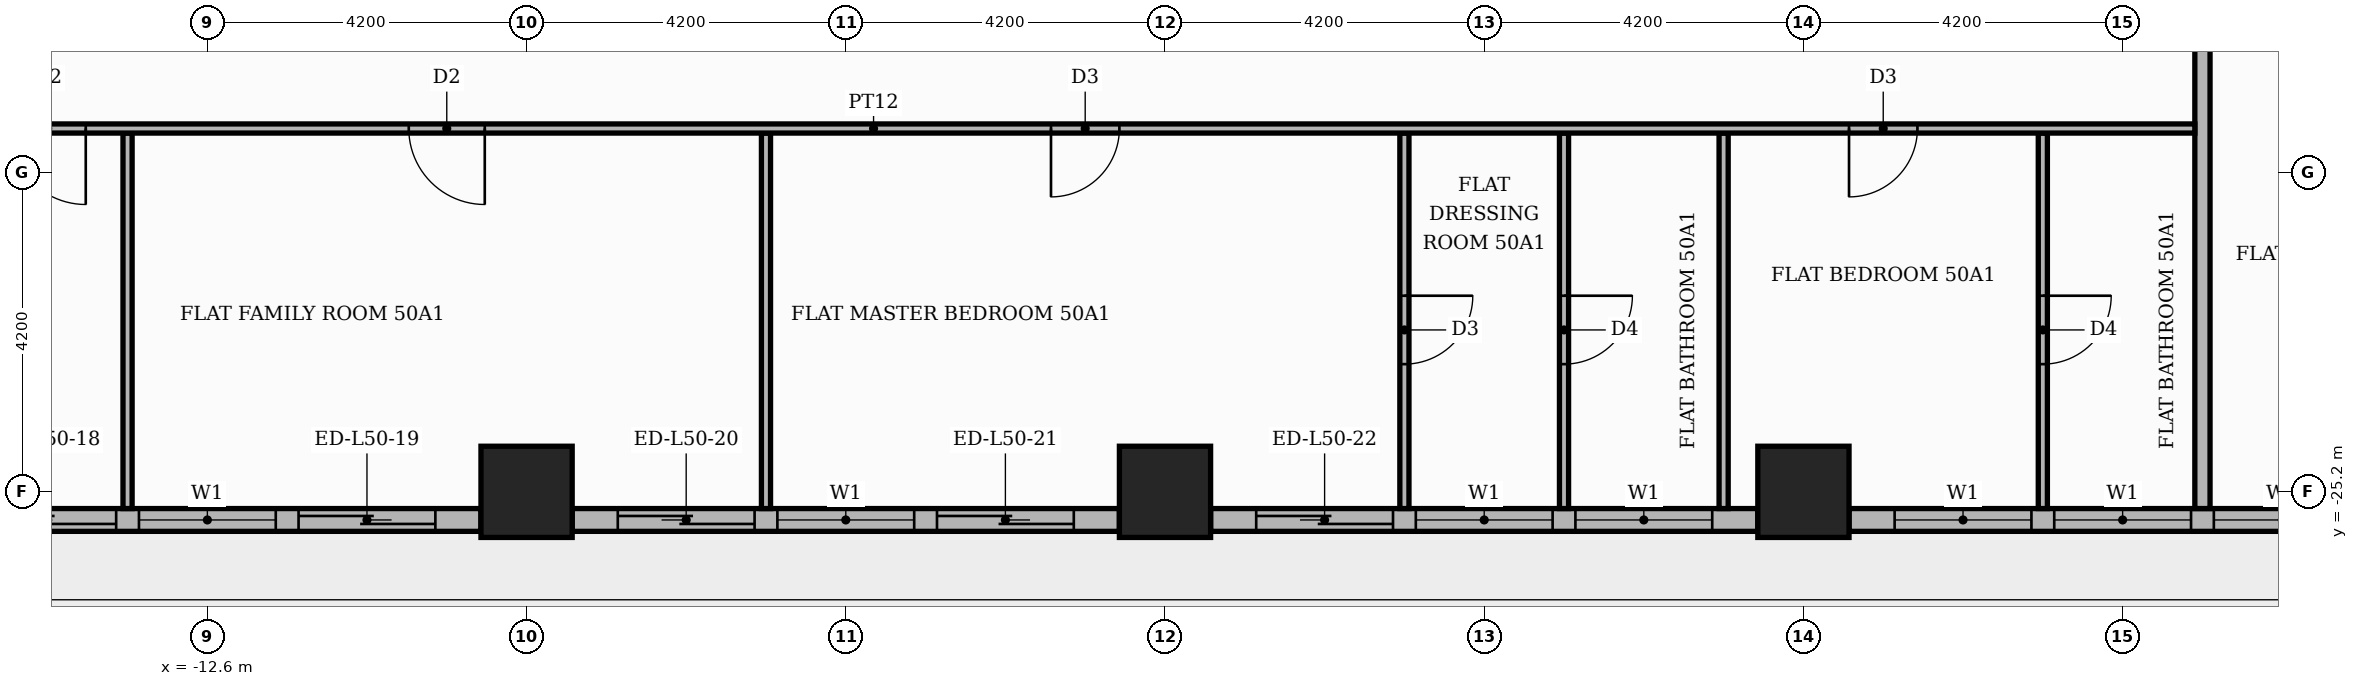
"""IFC4 building model, lengths in metres.
Left out: names, types, materials, properties, quantities, classifications, styles, units other than length and angle.
Written with IfcOpenShell. Run it as: python <this file> out.ifc"""

import sys

from ifc_helpers import new_model, si_unit, direction, frame, frame_2d, origin, origin_2d, place, context, subcontext, project, spatial, rectangle, extrude, element, fill, save


model = new_model("IFC4")
c1 = context("Model", 3, precision=1e-05, world=origin(), true_north=direction((0.0, 1.0)))
c2 = subcontext(c1, "Body", "Model", "MODEL_VIEW")
j1 = project(units=[si_unit("LENGTHUNIT", "METRE"), si_unit("PLANEANGLEUNIT", "RADIAN")], contexts=[c1])
p1 = place(None, origin())
s1 = spatial("IfcSite", under=j1, at=p1, CompositionType="ELEMENT")
p2 = place(p1, origin())
s2 = spatial("IfcBuilding", under=s1, at=p2, CompositionType="ELEMENT")
p3 = place(p2, frame((0.0, 0.0, 211.8)))
s3 = spatial("IfcBuildingStorey", under=s2, at=p3, CompositionType="ELEMENT", Elevation=211.8)
for number, where, z_axis, x_axis in (
    (1, (0.0, -25.2, 0.0), (0.0, 0.0, 1.0), (1.0, 0.0, 0.0)),
    (2, (8.4, -25.2, 0.0), (0.0, 0.0, 1.0), (1.0, 0.0, 0.0)),
    (3, (-8.4, -25.2, 0.0), (0.0, 0.0, 1.0), (1.0, 0.0, 0.0)),
):
    element("IfcColumn", number, at=place(p3, frame(where, z_axis=z_axis, x_axis=x_axis)), inside=s3, PredefinedType="COLUMN", context=c2, shape_type="SweptSolid", body=[
        extrude(rectangle(XDim=1.2, YDim=1.2, at=origin_2d()), origin(), (0.0, 0.0, 1.0), 3.9),
    ])
p4 = place(p3, frame((-16.2, -25.57, 0.0), z_axis=(0.0, 0.0, 1.0), x_axis=(1.0, 0.0, 0.0)))
e4 = element("IfcWall", 4, at=p4, inside=s3, PredefinedType="STANDARD", context=c2, shape_type="SweptSolid", body=[
    extrude(rectangle(XDim=7.2, YDim=0.3, at=frame_2d((3.6, 0.0))), origin(), (0.0, 0.0, 1.0), 3.48),
])
p5 = place(p4, frame((0.6, 0.0, 0.0)))
e5 = element("IfcOpeningElement", 5, at=p5, cuts=e4, PredefinedType="OPENING", context=c2, shape_type="SweptSolid", body=[
    extrude(rectangle(XDim=1.8, YDim=2.4, at=frame_2d((0.9, 1.2))), frame((0.0, 0.16, 0.0), z_axis=(0.0, -1.0, 0.0), x_axis=(1.0, 0.0, 0.0)), (0.0, 0.0, 1.0), 0.32),
])
p6 = place(p4, frame((2.7, 0.0, 0.9)))
e6 = element("IfcOpeningElement", 6, at=p6, cuts=e4, PredefinedType="OPENING", context=c2, shape_type="SweptSolid", body=[
    extrude(rectangle(XDim=1.8, YDim=2.1, at=frame_2d((0.9, 1.05))), frame((0.0, 0.16, 0.0), z_axis=(0.0, -1.0, 0.0), x_axis=(1.0, 0.0, 0.0)), (0.0, 0.0, 1.0), 0.32),
])
p7 = place(p4, frame((4.8, 0.0, 0.0)))
e7 = element("IfcOpeningElement", 7, at=p7, cuts=e4, PredefinedType="OPENING", context=c2, shape_type="SweptSolid", body=[
    extrude(rectangle(XDim=1.8, YDim=2.4, at=frame_2d((0.9, 1.2))), frame((0.0, 0.16, 0.0), z_axis=(0.0, -1.0, 0.0), x_axis=(1.0, 0.0, 0.0)), (0.0, 0.0, 1.0), 0.32),
])
p8 = place(p3, frame((-7.8, -25.57, 0.0), z_axis=(0.0, 0.0, 1.0), x_axis=(1.0, 0.0, 0.0)))
e8 = element("IfcWall", 8, at=p8, inside=s3, PredefinedType="STANDARD", context=c2, shape_type="SweptSolid", body=[
    extrude(rectangle(XDim=7.2, YDim=0.3, at=frame_2d((3.6, 0.0))), origin(), (0.0, 0.0, 1.0), 3.48),
])
p9 = place(p8, frame((0.6, 0.0, 0.0)))
e9 = element("IfcOpeningElement", 9, at=p9, cuts=e8, PredefinedType="OPENING", context=c2, shape_type="SweptSolid", body=[
    extrude(rectangle(XDim=1.8, YDim=2.4, at=frame_2d((0.9, 1.2))), frame((0.0, 0.16, 0.0), z_axis=(0.0, -1.0, 0.0), x_axis=(1.0, 0.0, 0.0)), (0.0, 0.0, 1.0), 0.32),
])
p10 = place(p8, frame((2.7, 0.0, 0.9)))
e10 = element("IfcOpeningElement", 10, at=p10, cuts=e8, PredefinedType="OPENING", context=c2, shape_type="SweptSolid", body=[
    extrude(rectangle(XDim=1.8, YDim=2.1, at=frame_2d((0.9, 1.05))), frame((0.0, 0.16, 0.0), z_axis=(0.0, -1.0, 0.0), x_axis=(1.0, 0.0, 0.0)), (0.0, 0.0, 1.0), 0.32),
])
p11 = place(p8, frame((4.8, 0.0, 0.0)))
e11 = element("IfcOpeningElement", 11, at=p11, cuts=e8, PredefinedType="OPENING", context=c2, shape_type="SweptSolid", body=[
    extrude(rectangle(XDim=1.8, YDim=2.4, at=frame_2d((0.9, 1.2))), frame((0.0, 0.16, 0.0), z_axis=(0.0, -1.0, 0.0), x_axis=(1.0, 0.0, 0.0)), (0.0, 0.0, 1.0), 0.32),
])
p12 = place(p3, frame((0.6, -25.57, 0.0), z_axis=(0.0, 0.0, 1.0), x_axis=(1.0, 0.0, 0.0)))
e12 = element("IfcWall", 12, at=p12, inside=s3, PredefinedType="STANDARD", context=c2, shape_type="SweptSolid", body=[
    extrude(rectangle(XDim=7.2, YDim=0.3, at=frame_2d((3.6, 0.0))), origin(), (0.0, 0.0, 1.0), 3.48),
])
p13 = place(p12, frame((0.6, 0.0, 0.0)))
e13 = element("IfcOpeningElement", 13, at=p13, cuts=e12, PredefinedType="OPENING", context=c2, shape_type="SweptSolid", body=[
    extrude(rectangle(XDim=1.8, YDim=2.4, at=frame_2d((0.9, 1.2))), frame((0.0, 0.16, 0.0), z_axis=(0.0, -1.0, 0.0), x_axis=(1.0, 0.0, 0.0)), (0.0, 0.0, 1.0), 0.32),
])
p14 = place(p12, frame((2.7, 0.0, 0.9)))
e14 = element("IfcOpeningElement", 14, at=p14, cuts=e12, PredefinedType="OPENING", context=c2, shape_type="SweptSolid", body=[
    extrude(rectangle(XDim=1.8, YDim=2.1, at=frame_2d((0.9, 1.05))), frame((0.0, 0.16, 0.0), z_axis=(0.0, -1.0, 0.0), x_axis=(1.0, 0.0, 0.0)), (0.0, 0.0, 1.0), 0.32),
])
p15 = place(p12, frame((4.8, 0.0, 0.9)))
e15 = element("IfcOpeningElement", 15, at=p15, cuts=e12, PredefinedType="OPENING", context=c2, shape_type="SweptSolid", body=[
    extrude(rectangle(XDim=1.8, YDim=2.1, at=frame_2d((0.9, 1.05))), frame((0.0, 0.16, 0.0), z_axis=(0.0, -1.0, 0.0), x_axis=(1.0, 0.0, 0.0)), (0.0, 0.0, 1.0), 0.32),
])
p16 = place(p3, frame((9.0, -25.57, 0.0), z_axis=(0.0, 0.0, 1.0), x_axis=(1.0, 0.0, 0.0)))
e16 = element("IfcWall", 16, at=p16, inside=s3, PredefinedType="STANDARD", context=c2, shape_type="SweptSolid", body=[
    extrude(rectangle(XDim=7.2, YDim=0.3, at=frame_2d((3.6, 0.0))), origin(), (0.0, 0.0, 1.0), 3.48),
])
p17 = place(p16, frame((0.6, 0.0, 0.9)))
e17 = element("IfcOpeningElement", 17, at=p17, cuts=e16, PredefinedType="OPENING", context=c2, shape_type="SweptSolid", body=[
    extrude(rectangle(XDim=1.8, YDim=2.1, at=frame_2d((0.9, 1.05))), frame((0.0, 0.16, 0.0), z_axis=(0.0, -1.0, 0.0), x_axis=(1.0, 0.0, 0.0)), (0.0, 0.0, 1.0), 0.32),
])
p18 = place(p16, frame((2.7, 0.0, 0.9)))
e18 = element("IfcOpeningElement", 18, at=p18, cuts=e16, PredefinedType="OPENING", context=c2, shape_type="SweptSolid", body=[
    extrude(rectangle(XDim=1.8, YDim=2.1, at=frame_2d((0.9, 1.05))), frame((0.0, 0.16, 0.0), z_axis=(0.0, -1.0, 0.0), x_axis=(1.0, 0.0, 0.0)), (0.0, 0.0, 1.0), 0.32),
])
p19 = place(p16, frame((4.8, 0.0, 0.9)))
e19 = element("IfcOpeningElement", 19, at=p19, cuts=e16, PredefinedType="OPENING", context=c2, shape_type="SweptSolid", body=[
    extrude(rectangle(XDim=1.8, YDim=2.1, at=frame_2d((0.9, 1.05))), frame((0.0, 0.16, 0.0), z_axis=(0.0, -1.0, 0.0), x_axis=(1.0, 0.0, 0.0)), (0.0, 0.0, 1.0), 0.32),
])
for number, where, z_axis, x_axis in (
    (20, (-13.65, -25.42, 0.0), (0.0, 0.0, 1.0), (0.0, 1.0, 0.0)),
    (21, (-5.25, -25.42, 0.0), (0.0, 0.0, 1.0), (0.0, 1.0, 0.0)),
):
    element("IfcWall", number, at=place(p3, frame(where, z_axis=z_axis, x_axis=x_axis)), inside=s3, PredefinedType="PARTITIONING", context=c2, shape_type="SweptSolid", body=[
        extrude(rectangle(XDim=4.94, YDim=0.12, at=frame_2d((2.47, 0.0))), origin(), (0.0, 0.0, 1.0), 3.48),
    ])
p20 = place(p3, frame((3.15, -25.42, 0.0), z_axis=(0.0, 0.0, 1.0), x_axis=(0.0, 1.0, 0.0)))
e22 = element("IfcWall", 22, at=p20, inside=s3, PredefinedType="PARTITIONING", context=c2, shape_type="SweptSolid", body=[
    extrude(rectangle(XDim=4.94, YDim=0.12, at=frame_2d((2.47, 0.0))), origin(), (0.0, 0.0, 1.0), 3.48),
])
p21 = place(p20, frame((1.9, 0.0, 0.0)))
e23 = element("IfcOpeningElement", 23, at=p21, cuts=e22, PredefinedType="OPENING", context=c2, shape_type="SweptSolid", body=[
    extrude(rectangle(XDim=0.9, YDim=2.1, at=frame_2d((0.45, 1.05))), frame((0.0, 0.07, 0.0), z_axis=(0.0, -1.0, 0.0), x_axis=(1.0, 0.0, 0.0)), (0.0, 0.0, 1.0), 0.14),
])
p22 = place(p3, frame((5.25, -25.42, 0.0), z_axis=(0.0, 0.0, 1.0), x_axis=(0.0, 1.0, 0.0)))
e24 = element("IfcWall", 24, at=p22, inside=s3, PredefinedType="PARTITIONING", context=c2, shape_type="SweptSolid", body=[
    extrude(rectangle(XDim=4.94, YDim=0.12, at=frame_2d((2.47, 0.0))), origin(), (0.0, 0.0, 1.0), 3.48),
])
p23 = place(p22, frame((1.9, 0.0, 0.0)))
e25 = element("IfcOpeningElement", 25, at=p23, cuts=e24, PredefinedType="OPENING", context=c2, shape_type="SweptSolid", body=[
    extrude(rectangle(XDim=0.9, YDim=2.1, at=frame_2d((0.45, 1.05))), frame((0.0, 0.07, 0.0), z_axis=(0.0, -1.0, 0.0), x_axis=(1.0, 0.0, 0.0)), (0.0, 0.0, 1.0), 0.14),
])
p24 = place(p3, frame((7.35, -25.42, 0.0), z_axis=(0.0, 0.0, 1.0), x_axis=(0.0, 1.0, 0.0)))
e26 = element("IfcWall", 26, at=p24, inside=s3, PredefinedType="PARTITIONING", context=c2, shape_type="SweptSolid", body=[
    extrude(rectangle(XDim=4.94, YDim=0.12, at=frame_2d((2.47, 0.0))), origin(), (0.0, 0.0, 1.0), 3.48),
])
p25 = place(p3, frame((11.55, -25.42, 0.0), z_axis=(0.0, 0.0, 1.0), x_axis=(0.0, 1.0, 0.0)))
e27 = element("IfcWall", 27, at=p25, inside=s3, PredefinedType="PARTITIONING", context=c2, shape_type="SweptSolid", body=[
    extrude(rectangle(XDim=4.94, YDim=0.12, at=frame_2d((2.47, 0.0))), origin(), (0.0, 0.0, 1.0), 3.48),
])
p26 = place(p25, frame((1.9, 0.0, 0.0)))
e28 = element("IfcOpeningElement", 28, at=p26, cuts=e27, PredefinedType="OPENING", context=c2, shape_type="SweptSolid", body=[
    extrude(rectangle(XDim=0.9, YDim=2.1, at=frame_2d((0.45, 1.05))), frame((0.0, 0.07, 0.0), z_axis=(0.0, -1.0, 0.0), x_axis=(1.0, 0.0, 0.0)), (0.0, 0.0, 1.0), 0.14),
])
p27 = place(p3, frame((13.65, -25.42, 0.0), z_axis=(0.0, 0.0, 1.0), x_axis=(0.0, 1.0, 0.0)))
e29 = element("IfcWall", 29, at=p27, inside=s3, PredefinedType="PARTITIONING", context=c2, shape_type="SweptSolid", body=[
    extrude(rectangle(XDim=11.67, YDim=0.2, at=frame_2d((5.835, 0.0))), origin(), (0.0, 0.0, 1.0), 3.48),
])
p28 = place(p3, frame((-21.219, -20.42, 0.0), z_axis=(0.0, 0.0, 1.0), x_axis=(1.0, 0.0, 0.0)))
e30 = element("IfcWall", 30, at=p28, inside=s3, PredefinedType="PARTITIONING", context=c2, shape_type="SweptSolid", body=[
    extrude(rectangle(XDim=34.769, YDim=0.12, at=frame_2d((17.385, 0.0))), origin(), (0.0, 0.0, 1.0), 3.48),
])
p29 = place(p28, frame((6.019, 0.0, 0.0)))
e31 = element("IfcOpeningElement", 31, at=p29, cuts=e30, PredefinedType="OPENING", context=c2, shape_type="SweptSolid", body=[
    extrude(rectangle(XDim=1.0, YDim=2.1, at=frame_2d((0.5, 1.05))), frame((0.0, 0.07, 0.0), z_axis=(0.0, -1.0, 0.0), x_axis=(1.0, 0.0, 0.0)), (0.0, 0.0, 1.0), 0.14),
])
p30 = place(p28, frame((11.269, 0.0, 0.0)))
e32 = element("IfcOpeningElement", 32, at=p30, cuts=e30, PredefinedType="OPENING", context=c2, shape_type="SweptSolid", body=[
    extrude(rectangle(XDim=1.0, YDim=2.1, at=frame_2d((0.5, 1.05))), frame((0.0, 0.07, 0.0), z_axis=(0.0, -1.0, 0.0), x_axis=(1.0, 0.0, 0.0)), (0.0, 0.0, 1.0), 0.14),
])
p31 = place(p28, frame((19.719, 0.0, 0.0)))
e33 = element("IfcOpeningElement", 33, at=p31, cuts=e30, PredefinedType="OPENING", context=c2, shape_type="SweptSolid", body=[
    extrude(rectangle(XDim=0.9, YDim=2.1, at=frame_2d((0.45, 1.05))), frame((0.0, 0.07, 0.0), z_axis=(0.0, -1.0, 0.0), x_axis=(1.0, 0.0, 0.0)), (0.0, 0.0, 1.0), 0.14),
])
p32 = place(p28, frame((30.219, 0.0, 0.0)))
e34 = element("IfcOpeningElement", 34, at=p32, cuts=e30, PredefinedType="OPENING", context=c2, shape_type="SweptSolid", body=[
    extrude(rectangle(XDim=0.9, YDim=2.1, at=frame_2d((0.45, 1.05))), frame((0.0, 0.07, 0.0), z_axis=(0.0, -1.0, 0.0), x_axis=(1.0, 0.0, 0.0)), (0.0, 0.0, 1.0), 0.14),
])
p33 = place(p5, origin())
e35 = element("IfcDoor", 35, at=p33, inside=s3, OperationType="SLIDING_TO_LEFT", PredefinedType="DOOR", context=c2, shape_type="SweptSolid", body=[
    extrude(rectangle(XDim=1.8, YDim=2.4, at=frame_2d((0.9, 1.2))), frame((0.0, 0.025, 0.0), z_axis=(0.0, -1.0, 0.0), x_axis=(1.0, 0.0, 0.0)), (0.0, 0.0, 1.0), 0.05),
])
fill(e5, e35)
p34 = place(p6, origin())
e36 = element("IfcWindow", 36, at=p34, inside=s3, PartitioningType="SINGLE_PANEL", PredefinedType="WINDOW", context=c2, shape_type="SweptSolid", body=[
    extrude(rectangle(XDim=1.8, YDim=2.1, at=frame_2d((0.9, 1.05))), frame((0.0, 0.03, 0.0), z_axis=(0.0, -1.0, 0.0), x_axis=(1.0, 0.0, 0.0)), (0.0, 0.0, 1.0), 0.06),
])
fill(e6, e36)
p35 = place(p7, origin())
e37 = element("IfcDoor", 37, at=p35, inside=s3, OperationType="SLIDING_TO_RIGHT", PredefinedType="DOOR", context=c2, shape_type="SweptSolid", body=[
    extrude(rectangle(XDim=1.8, YDim=2.4, at=frame_2d((0.9, 1.2))), frame((0.0, 0.025, 0.0), z_axis=(0.0, -1.0, 0.0), x_axis=(1.0, 0.0, 0.0)), (0.0, 0.0, 1.0), 0.05),
])
fill(e7, e37)
p36 = place(p9, origin())
e38 = element("IfcDoor", 38, at=p36, inside=s3, OperationType="SLIDING_TO_LEFT", PredefinedType="DOOR", context=c2, shape_type="SweptSolid", body=[
    extrude(rectangle(XDim=1.8, YDim=2.4, at=frame_2d((0.9, 1.2))), frame((0.0, 0.025, 0.0), z_axis=(0.0, -1.0, 0.0), x_axis=(1.0, 0.0, 0.0)), (0.0, 0.0, 1.0), 0.05),
])
fill(e9, e38)
p37 = place(p10, origin())
e39 = element("IfcWindow", 39, at=p37, inside=s3, PartitioningType="SINGLE_PANEL", PredefinedType="WINDOW", context=c2, shape_type="SweptSolid", body=[
    extrude(rectangle(XDim=1.8, YDim=2.1, at=frame_2d((0.9, 1.05))), frame((0.0, 0.03, 0.0), z_axis=(0.0, -1.0, 0.0), x_axis=(1.0, 0.0, 0.0)), (0.0, 0.0, 1.0), 0.06),
])
fill(e10, e39)
p38 = place(p11, origin())
e40 = element("IfcDoor", 40, at=p38, inside=s3, OperationType="SLIDING_TO_RIGHT", PredefinedType="DOOR", context=c2, shape_type="SweptSolid", body=[
    extrude(rectangle(XDim=1.8, YDim=2.4, at=frame_2d((0.9, 1.2))), frame((0.0, 0.025, 0.0), z_axis=(0.0, -1.0, 0.0), x_axis=(1.0, 0.0, 0.0)), (0.0, 0.0, 1.0), 0.05),
])
fill(e11, e40)
p39 = place(p13, origin())
e41 = element("IfcDoor", 41, at=p39, inside=s3, OperationType="SLIDING_TO_LEFT", PredefinedType="DOOR", context=c2, shape_type="SweptSolid", body=[
    extrude(rectangle(XDim=1.8, YDim=2.4, at=frame_2d((0.9, 1.2))), frame((0.0, 0.025, 0.0), z_axis=(0.0, -1.0, 0.0), x_axis=(1.0, 0.0, 0.0)), (0.0, 0.0, 1.0), 0.05),
])
fill(e13, e41)
p40 = place(p14, origin())
e42 = element("IfcWindow", 42, at=p40, inside=s3, PartitioningType="SINGLE_PANEL", PredefinedType="WINDOW", context=c2, shape_type="SweptSolid", body=[
    extrude(rectangle(XDim=1.8, YDim=2.1, at=frame_2d((0.9, 1.05))), frame((0.0, 0.03, 0.0), z_axis=(0.0, -1.0, 0.0), x_axis=(1.0, 0.0, 0.0)), (0.0, 0.0, 1.0), 0.06),
])
fill(e14, e42)
p41 = place(p15, origin())
e43 = element("IfcWindow", 43, at=p41, inside=s3, PartitioningType="SINGLE_PANEL", PredefinedType="WINDOW", context=c2, shape_type="SweptSolid", body=[
    extrude(rectangle(XDim=1.8, YDim=2.1, at=frame_2d((0.9, 1.05))), frame((0.0, 0.03, 0.0), z_axis=(0.0, -1.0, 0.0), x_axis=(1.0, 0.0, 0.0)), (0.0, 0.0, 1.0), 0.06),
])
fill(e15, e43)
p42 = place(p17, origin())
e44 = element("IfcWindow", 44, at=p42, inside=s3, PartitioningType="SINGLE_PANEL", PredefinedType="WINDOW", context=c2, shape_type="SweptSolid", body=[
    extrude(rectangle(XDim=1.8, YDim=2.1, at=frame_2d((0.9, 1.05))), frame((0.0, 0.03, 0.0), z_axis=(0.0, -1.0, 0.0), x_axis=(1.0, 0.0, 0.0)), (0.0, 0.0, 1.0), 0.06),
])
fill(e17, e44)
p43 = place(p18, origin())
e45 = element("IfcWindow", 45, at=p43, inside=s3, PartitioningType="SINGLE_PANEL", PredefinedType="WINDOW", context=c2, shape_type="SweptSolid", body=[
    extrude(rectangle(XDim=1.8, YDim=2.1, at=frame_2d((0.9, 1.05))), frame((0.0, 0.03, 0.0), z_axis=(0.0, -1.0, 0.0), x_axis=(1.0, 0.0, 0.0)), (0.0, 0.0, 1.0), 0.06),
])
fill(e18, e45)
p44 = place(p19, origin())
e46 = element("IfcWindow", 46, at=p44, inside=s3, PartitioningType="SINGLE_PANEL", PredefinedType="WINDOW", context=c2, shape_type="SweptSolid", body=[
    extrude(rectangle(XDim=1.8, YDim=2.1, at=frame_2d((0.9, 1.05))), frame((0.0, 0.03, 0.0), z_axis=(0.0, -1.0, 0.0), x_axis=(1.0, 0.0, 0.0)), (0.0, 0.0, 1.0), 0.06),
])
fill(e19, e46)
p45 = place(p29, frame((1.0, 0.0, 0.0), z_axis=(0.0, 0.0, 1.0), x_axis=(-1.0, 0.0, 0.0)))
e47 = element("IfcDoor", 47, at=p45, inside=s3, OperationType="SINGLE_SWING_RIGHT", PredefinedType="DOOR", context=c2, shape_type="SweptSolid", body=[
    extrude(rectangle(XDim=1.0, YDim=2.1, at=frame_2d((0.5, 1.05))), frame((0.0, 0.025, 0.0), z_axis=(0.0, -1.0, 0.0), x_axis=(1.0, 0.0, 0.0)), (0.0, 0.0, 1.0), 0.05),
])
fill(e31, e47)
p46 = place(p30, frame((1.0, 0.0, 0.0), z_axis=(0.0, 0.0, 1.0), x_axis=(-1.0, 0.0, 0.0)))
e48 = element("IfcDoor", 48, at=p46, inside=s3, OperationType="SINGLE_SWING_RIGHT", PredefinedType="DOOR", context=c2, shape_type="SweptSolid", body=[
    extrude(rectangle(XDim=1.0, YDim=2.1, at=frame_2d((0.5, 1.05))), frame((0.0, 0.025, 0.0), z_axis=(0.0, -1.0, 0.0), x_axis=(1.0, 0.0, 0.0)), (0.0, 0.0, 1.0), 0.05),
])
fill(e32, e48)
p47 = place(p31, frame((0.9, 0.0, 0.0), z_axis=(0.0, 0.0, 1.0), x_axis=(-1.0, 0.0, 0.0)))
e49 = element("IfcDoor", 49, at=p47, inside=s3, OperationType="SINGLE_SWING_LEFT", PredefinedType="DOOR", context=c2, shape_type="SweptSolid", body=[
    extrude(rectangle(XDim=0.9, YDim=2.1, at=frame_2d((0.45, 1.05))), frame((0.0, 0.025, 0.0), z_axis=(0.0, -1.0, 0.0), x_axis=(1.0, 0.0, 0.0)), (0.0, 0.0, 1.0), 0.05),
])
fill(e33, e49)
p48 = place(p21, frame((0.9, 0.0, 0.0), z_axis=(0.0, 0.0, 1.0), x_axis=(-1.0, 0.0, 0.0)))
e50 = element("IfcDoor", 50, at=p48, inside=s3, OperationType="SINGLE_SWING_RIGHT", PredefinedType="DOOR", context=c2, shape_type="SweptSolid", body=[
    extrude(rectangle(XDim=0.9, YDim=2.1, at=frame_2d((0.45, 1.05))), frame((0.0, 0.025, 0.0), z_axis=(0.0, -1.0, 0.0), x_axis=(1.0, 0.0, 0.0)), (0.0, 0.0, 1.0), 0.05),
])
fill(e23, e50)
p49 = place(p23, frame((0.9, 0.0, 0.0), z_axis=(0.0, 0.0, 1.0), x_axis=(-1.0, 0.0, 0.0)))
e51 = element("IfcDoor", 51, at=p49, inside=s3, OperationType="SINGLE_SWING_RIGHT", PredefinedType="DOOR", context=c2, shape_type="SweptSolid", body=[
    extrude(rectangle(XDim=0.9, YDim=2.1, at=frame_2d((0.45, 1.05))), frame((0.0, 0.025, 0.0), z_axis=(0.0, -1.0, 0.0), x_axis=(1.0, 0.0, 0.0)), (0.0, 0.0, 1.0), 0.05),
])
fill(e25, e51)
p50 = place(p32, frame((0.9, 0.0, 0.0), z_axis=(0.0, 0.0, 1.0), x_axis=(-1.0, 0.0, 0.0)))
e52 = element("IfcDoor", 52, at=p50, inside=s3, OperationType="SINGLE_SWING_LEFT", PredefinedType="DOOR", context=c2, shape_type="SweptSolid", body=[
    extrude(rectangle(XDim=0.9, YDim=2.1, at=frame_2d((0.45, 1.05))), frame((0.0, 0.025, 0.0), z_axis=(0.0, -1.0, 0.0), x_axis=(1.0, 0.0, 0.0)), (0.0, 0.0, 1.0), 0.05),
])
fill(e34, e52)
p51 = place(p26, frame((0.9, 0.0, 0.0), z_axis=(0.0, 0.0, 1.0), x_axis=(-1.0, 0.0, 0.0)))
e53 = element("IfcDoor", 53, at=p51, inside=s3, OperationType="SINGLE_SWING_RIGHT", PredefinedType="DOOR", context=c2, shape_type="SweptSolid", body=[
    extrude(rectangle(XDim=0.9, YDim=2.1, at=frame_2d((0.45, 1.05))), frame((0.0, 0.025, 0.0), z_axis=(0.0, -1.0, 0.0), x_axis=(1.0, 0.0, 0.0)), (0.0, 0.0, 1.0), 0.05),
])
fill(e28, e53)
save(model, sys.argv[1])
